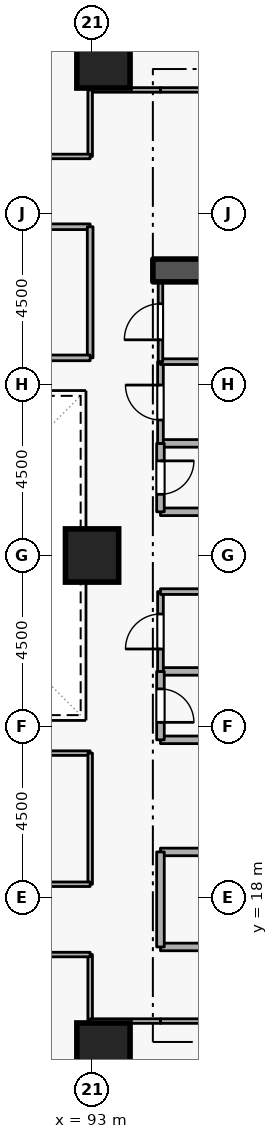
"""IFC4 building model, lengths in metres.
Left out: names, types, materials, properties, quantities, classifications, styles, units other than length and angle.
Written with IfcOpenShell. Run it as: python <this file> out.ifc"""

import sys

from ifc_helpers import new_model, si_unit, direction, frame, frame_2d, origin, origin_2d, place, context, subcontext, project, spatial, rectangle, extrude, element, fill, save


model = new_model("IFC4")
c1 = context("Model", 3, precision=1e-05, world=origin(), true_north=direction((0.0, 1.0)))
c2 = subcontext(c1, "Body", "Model", "MODEL_VIEW")
j1 = project(units=[si_unit("LENGTHUNIT", "METRE"), si_unit("PLANEANGLEUNIT", "RADIAN")], contexts=[c1])
p1 = place(None, origin())
s1 = spatial("IfcSite", under=j1, at=p1, CompositionType="ELEMENT")
p2 = place(p1, origin())
s2 = spatial("IfcBuilding", under=s1, at=p2, CompositionType="ELEMENT")
p3 = place(p2, frame((0.0, 0.0, 68.1)))
s3 = spatial("IfcBuildingStorey", under=s2, at=p3, CompositionType="ELEMENT", Elevation=68.1)
p4 = place(p3, frame((94.6, 34.5, 0.0), z_axis=(0.0, 0.0, 1.0), x_axis=(1.0, 0.0, 0.0)))
e1 = element("IfcWall", 1, at=p4, inside=s3, PredefinedType="SHEAR", context=c2, shape_type="SweptSolid", body=[
    extrude(rectangle(XDim=5.7, YDim=0.6, at=frame_2d((2.85, 0.0))), origin(), (0.0, 0.0, 1.0), 3.6),
])
for number, where, z_axis, x_axis in (
    (2, (93.3, 14.0, 0.0), (0.0, 0.0, 1.0), (1.0, 0.0, 0.0)),
    (3, (93.3, 40.0, 0.0), (0.0, 0.0, 1.0), (1.0, 0.0, 0.0)),
    (4, (93.0, 27.0, 0.0), (0.0, 0.0, 1.0), (1.0, 0.0, 0.0)),
):
    element("IfcColumn", number, at=place(p3, frame(where, z_axis=z_axis, x_axis=x_axis)), inside=s3, PredefinedType="COLUMN", context=c2, shape_type="SweptSolid", body=[
        extrude(rectangle(XDim=1.4, YDim=1.4, at=origin_2d()), origin(), (0.0, 0.0, 1.0), 3.6),
    ])
p5 = place(p3, frame((94.8, 16.7, 0.0), z_axis=(0.0, 0.0, 1.0), x_axis=(1.0, 0.0, 0.0)))
e5 = element("IfcWall", 5, at=p5, inside=s3, PredefinedType="STANDARD", context=c2, shape_type="SweptSolid", body=[
    extrude(rectangle(XDim=5.7, YDim=0.2, at=frame_2d((2.85, 0.0))), origin(), (0.0, 0.0, 1.0), 3.26),
])
p6 = place(p5, frame((2.275, 0.0, 0.0)))
e6 = element("IfcOpeningElement", 6, at=p6, cuts=e5, PredefinedType="OPENING", context=c2, shape_type="SweptSolid", body=[
    extrude(rectangle(XDim=1.15, YDim=2.1, at=frame_2d((0.575, 1.05))), frame((0.0, 0.11, 0.0), z_axis=(0.0, -1.0, 0.0), x_axis=(1.0, 0.0, 0.0)), (0.0, 0.0, 1.0), 0.22),
])
p7 = place(p3, frame((97.1, 19.2, 0.0), z_axis=(0.0, 0.0, 1.0), x_axis=(-1.0, 0.0, 0.0)))
e7 = element("IfcWall", 7, at=p7, inside=s3, PredefinedType="STANDARD", context=c2, shape_type="SweptSolid", body=[
    extrude(rectangle(XDim=2.3, YDim=0.2, at=frame_2d((1.15, 0.0))), origin(), (0.0, 0.0, 1.0), 2.465),
])
p8 = place(p3, frame((94.8, 19.2, 0.0), z_axis=(0.0, 0.0, 1.0), x_axis=(0.0, -1.0, 0.0)))
e8 = element("IfcWall", 8, at=p8, inside=s3, PredefinedType="STANDARD", context=c2, shape_type="SweptSolid", body=[
    extrude(rectangle(XDim=2.5, YDim=0.2, at=frame_2d((1.25, 0.0))), origin(), (0.0, 0.0, 1.0), 3.26),
])
for number, where, z_axis, x_axis in (
    (9, (94.8, 28.15, 0.0), (0.0, 0.0, 1.0), (1.0, 0.0, 0.0)),
    (10, (96.85, 29.95, 0.0), (0.0, 0.0, 1.0), (-1.0, 0.0, 0.0)),
):
    element("IfcWall", number, at=place(p3, frame(where, z_axis=z_axis, x_axis=x_axis)), inside=s3, PredefinedType="STANDARD", context=c2, shape_type="SweptSolid", body=[
        extrude(rectangle(XDim=2.05, YDim=0.2, at=frame_2d((1.025, 0.0))), origin(), (0.0, 0.0, 1.0), 3.26),
    ])
p9 = place(p3, frame((94.8, 29.95, 0.0), z_axis=(0.0, 0.0, 1.0), x_axis=(0.0, -1.0, 0.0)))
e11 = element("IfcWall", 11, at=p9, inside=s3, PredefinedType="STANDARD", context=c2, shape_type="SweptSolid", body=[
    extrude(rectangle(XDim=1.8, YDim=0.2, at=frame_2d((0.9, 0.0))), origin(), (0.0, 0.0, 1.0), 3.26),
])
p10 = place(p9, frame((0.46, 0.0, 0.0)))
e12 = element("IfcOpeningElement", 12, at=p10, cuts=e11, PredefinedType="OPENING", context=c2, shape_type="SweptSolid", body=[
    extrude(rectangle(XDim=0.88, YDim=2.04, at=frame_2d((0.44, 1.02))), frame((0.0, 0.11, 0.0), z_axis=(0.0, -1.0, 0.0), x_axis=(1.0, 0.0, 0.0)), (0.0, 0.0, 1.0), 0.22),
])
for number, where, z_axis, x_axis in (
    (13, (94.8, 22.15, 0.0), (0.0, 0.0, 1.0), (1.0, 0.0, 0.0)),
    (14, (96.85, 23.95, 0.0), (0.0, 0.0, 1.0), (-1.0, 0.0, 0.0)),
):
    element("IfcWall", number, at=place(p3, frame(where, z_axis=z_axis, x_axis=x_axis)), inside=s3, PredefinedType="STANDARD", context=c2, shape_type="SweptSolid", body=[
        extrude(rectangle(XDim=2.05, YDim=0.2, at=frame_2d((1.025, 0.0))), origin(), (0.0, 0.0, 1.0), 3.26),
    ])
p11 = place(p3, frame((94.8, 23.95, 0.0), z_axis=(0.0, 0.0, 1.0), x_axis=(0.0, -1.0, 0.0)))
e15 = element("IfcWall", 15, at=p11, inside=s3, PredefinedType="STANDARD", context=c2, shape_type="SweptSolid", body=[
    extrude(rectangle(XDim=1.8, YDim=0.2, at=frame_2d((0.9, 0.0))), origin(), (0.0, 0.0, 1.0), 3.26),
])
p12 = place(p11, frame((0.46, 0.0, 0.0)))
e16 = element("IfcOpeningElement", 16, at=p12, cuts=e15, PredefinedType="OPENING", context=c2, shape_type="SweptSolid", body=[
    extrude(rectangle(XDim=0.88, YDim=2.04, at=frame_2d((0.44, 1.02))), frame((0.0, 0.11, 0.0), z_axis=(0.0, -1.0, 0.0), x_axis=(1.0, 0.0, 0.0)), (0.0, 0.0, 1.0), 0.22),
])
p13 = place(p3, frame((94.8, 23.95, 0.0), z_axis=(0.0, 0.0, 1.0), x_axis=(0.0, 1.0, 0.0)))
e17 = element("IfcWall", 17, at=p13, inside=s3, PredefinedType="PARTITIONING", context=c2, shape_type="SweptSolid", body=[
    extrude(rectangle(XDim=2.1, YDim=0.15, at=frame_2d((1.05, 0.0))), origin(), (0.0, 0.0, 1.0), 3.26),
])
p14 = place(p13, frame((0.59, 0.0, 0.0)))
e18 = element("IfcOpeningElement", 18, at=p14, cuts=e17, PredefinedType="OPENING", context=c2, shape_type="SweptSolid", body=[
    extrude(rectangle(XDim=0.92, YDim=2.08, at=frame_2d((0.46, 1.04))), frame((0.0, 0.085, 0.0), z_axis=(0.0, -1.0, 0.0), x_axis=(1.0, 0.0, 0.0)), (0.0, 0.0, 1.0), 0.17),
])
p15 = place(p3, frame((94.8, 26.05, 0.0), z_axis=(0.0, 0.0, 1.0), x_axis=(1.0, 0.0, 0.0)))
e19 = element("IfcWall", 19, at=p15, inside=s3, PredefinedType="PARTITIONING", context=c2, shape_type="SweptSolid", body=[
    extrude(rectangle(XDim=2.05, YDim=0.15, at=frame_2d((1.025, 0.0))), origin(), (0.0, 0.0, 1.0), 3.26),
])
p16 = place(p3, frame((94.8, 29.95, 0.0), z_axis=(0.0, 0.0, 1.0), x_axis=(0.0, 1.0, 0.0)))
e20 = element("IfcWall", 20, at=p16, inside=s3, PredefinedType="PARTITIONING", context=c2, shape_type="SweptSolid", body=[
    extrude(rectangle(XDim=2.15, YDim=0.15, at=frame_2d((1.075, 0.0))), origin(), (0.0, 0.0, 1.0), 3.26),
])
p17 = place(p16, frame((0.615, 0.0, 0.0)))
e21 = element("IfcOpeningElement", 21, at=p17, cuts=e20, PredefinedType="OPENING", context=c2, shape_type="SweptSolid", body=[
    extrude(rectangle(XDim=0.92, YDim=2.08, at=frame_2d((0.46, 1.04))), frame((0.0, 0.085, 0.0), z_axis=(0.0, -1.0, 0.0), x_axis=(1.0, 0.0, 0.0)), (0.0, 0.0, 1.0), 0.17),
])
p18 = place(p3, frame((94.8, 32.1, 0.0), z_axis=(0.0, 0.0, 1.0), x_axis=(1.0, 0.0, 0.0)))
e22 = element("IfcWall", 22, at=p18, inside=s3, PredefinedType="PARTITIONING", context=c2, shape_type="SweptSolid", body=[
    extrude(rectangle(XDim=2.05, YDim=0.15, at=frame_2d((1.025, 0.0))), origin(), (0.0, 0.0, 1.0), 3.26),
])
p19 = place(p3, frame((94.8, 32.1, 0.0), z_axis=(0.0, 0.0, 1.0), x_axis=(0.0, 1.0, 0.0)))
e23 = element("IfcWall", 23, at=p19, inside=s3, PredefinedType="PARTITIONING", context=c2, shape_type="SweptSolid", body=[
    extrude(rectangle(XDim=2.1, YDim=0.12, at=frame_2d((1.05, 0.0))), origin(), (0.0, 0.0, 1.0), 3.26),
])
p20 = place(p19, frame((0.575, 0.0, 0.0)))
e24 = element("IfcOpeningElement", 24, at=p20, cuts=e23, PredefinedType="OPENING", context=c2, shape_type="SweptSolid", body=[
    extrude(rectangle(XDim=0.95, YDim=2.1, at=frame_2d((0.475, 1.05))), frame((0.0, 0.07, 0.0), z_axis=(0.0, -1.0, 0.0), x_axis=(1.0, 0.0, 0.0)), (0.0, 0.0, 1.0), 0.14),
])
p21 = place(p3, frame((92.95, 16.5, 0.0), z_axis=(0.0, 0.0, 1.0), x_axis=(0.0, -1.0, 0.0)))
e25 = element("IfcWall", 25, at=p21, inside=s3, PredefinedType="PARTITIONING", context=c2, shape_type="SweptSolid", body=[
    extrude(rectangle(XDim=1.75, YDim=0.12, at=frame_2d((0.875, 0.0))), origin(), (0.0, 0.0, 1.0), 3.26),
])
p22 = place(p3, frame((92.95, 14.75, 0.0), z_axis=(0.0, 0.0, 1.0), x_axis=(1.0, 0.0, 0.0)))
e26 = element("IfcWall", 26, at=p22, inside=s3, PredefinedType="PARTITIONING", context=c2, shape_type="SweptSolid", body=[
    extrude(rectangle(XDim=1.85, YDim=0.12, at=frame_2d((0.925, 0.0))), origin(), (0.0, 0.0, 1.0), 3.26),
])
p23 = place(p3, frame((94.8, 14.75, 0.0), z_axis=(0.0, 0.0, 1.0), x_axis=(1.0, 0.0, 0.0)))
e27 = element("IfcWall", 27, at=p23, inside=s3, PredefinedType="PARTITIONING", context=c2, shape_type="SweptSolid", body=[
    extrude(rectangle(XDim=9.35, YDim=0.12, at=frame_2d((4.675, 0.0))), origin(), (0.0, 0.0, 1.0), 3.26),
])
p24 = place(p23, frame((4.15, 0.0, 0.0)))
e28 = element("IfcOpeningElement", 28, at=p24, cuts=e27, PredefinedType="OPENING", context=c2, shape_type="SweptSolid", body=[
    extrude(rectangle(XDim=1.05, YDim=2.1, at=frame_2d((0.525, 1.05))), frame((0.0, 0.07, 0.0), z_axis=(0.0, -1.0, 0.0), x_axis=(1.0, 0.0, 0.0)), (0.0, 0.0, 1.0), 0.14),
])
p25 = place(p3, frame((88.5, 16.5, 0.0), z_axis=(0.0, 0.0, 1.0), x_axis=(1.0, 0.0, 0.0)))
e29 = element("IfcWall", 29, at=p25, inside=s3, PredefinedType="PARTITIONING", context=c2, shape_type="SweptSolid", body=[
    extrude(rectangle(XDim=4.45, YDim=0.12, at=frame_2d((2.225, 0.0))), origin(), (0.0, 0.0, 1.0), 3.26),
])
p26 = place(p3, frame((97.95, 39.25, 0.0), z_axis=(0.0, 0.0, 1.0), x_axis=(-1.0, 0.0, 0.0)))
e30 = element("IfcWall", 30, at=p26, inside=s3, PredefinedType="PARTITIONING", context=c2, shape_type="SweptSolid", body=[
    extrude(rectangle(XDim=3.15, YDim=0.12, at=frame_2d((1.575, 0.0))), origin(), (0.0, 0.0, 1.0), 3.26),
])
p27 = place(p3, frame((94.8, 39.25, 0.0), z_axis=(0.0, 0.0, 1.0), x_axis=(-1.0, 0.0, 0.0)))
e31 = element("IfcWall", 31, at=p27, inside=s3, PredefinedType="PARTITIONING", context=c2, shape_type="SweptSolid", body=[
    extrude(rectangle(XDim=1.85, YDim=0.12, at=frame_2d((0.925, 0.0))), origin(), (0.0, 0.0, 1.0), 3.26),
])
p28 = place(p3, frame((92.95, 39.25, 0.0), z_axis=(0.0, 0.0, 1.0), x_axis=(0.0, -1.0, 0.0)))
e32 = element("IfcWall", 32, at=p28, inside=s3, PredefinedType="PARTITIONING", context=c2, shape_type="SweptSolid", body=[
    extrude(rectangle(XDim=1.75, YDim=0.12, at=frame_2d((0.875, 0.0))), origin(), (0.0, 0.0, 1.0), 3.26),
])
p29 = place(p3, frame((92.95, 37.5, 0.0), z_axis=(0.0, 0.0, 1.0), x_axis=(-1.0, 0.0, 0.0)))
e33 = element("IfcWall", 33, at=p29, inside=s3, PredefinedType="PARTITIONING", context=c2, shape_type="SweptSolid", body=[
    extrude(rectangle(XDim=4.45, YDim=0.12, at=frame_2d((2.225, 0.0))), origin(), (0.0, 0.0, 1.0), 3.26),
])
p30 = place(p29, frame((1.7, 0.0, 0.0)))
e34 = element("IfcOpeningElement", 34, at=p30, cuts=e33, PredefinedType="OPENING", context=c2, shape_type="SweptSolid", body=[
    extrude(rectangle(XDim=1.05, YDim=2.1, at=frame_2d((0.525, 1.05))), frame((0.0, 0.07, 0.0), z_axis=(0.0, -1.0, 0.0), x_axis=(1.0, 0.0, 0.0)), (0.0, 0.0, 1.0), 0.14),
])
p31 = place(p3, frame((84.05, 35.65, 0.0), z_axis=(0.0, 0.0, 1.0), x_axis=(1.0, 0.0, 0.0)))
e35 = element("IfcWall", 35, at=p31, inside=s3, PredefinedType="PARTITIONING", context=c2, shape_type="SweptSolid", body=[
    extrude(rectangle(XDim=8.9, YDim=0.15, at=frame_2d((4.45, 0.0))), origin(), (0.0, 0.0, 1.0), 3.26),
])
p32 = place(p31, frame((3.8, 0.0, 0.0)))
e36 = element("IfcOpeningElement", 36, at=p32, cuts=e35, PredefinedType="OPENING", context=c2, shape_type="SweptSolid", body=[
    extrude(rectangle(XDim=1.3, YDim=2.12, at=frame_2d((0.65, 1.06))), frame((0.0, 0.085, 0.0), z_axis=(0.0, -1.0, 0.0), x_axis=(1.0, 0.0, 0.0)), (0.0, 0.0, 1.0), 0.17),
])
p33 = place(p3, frame((92.95, 35.65, 0.0), z_axis=(0.0, 0.0, 1.0), x_axis=(0.0, -1.0, 0.0)))
e37 = element("IfcWall", 37, at=p33, inside=s3, PredefinedType="PARTITIONING", context=c2, shape_type="SweptSolid", body=[
    extrude(rectangle(XDim=3.45, YDim=0.15, at=frame_2d((1.725, 0.0))), origin(), (0.0, 0.0, 1.0), 3.26),
])
p34 = place(p3, frame((92.95, 32.2, 0.0), z_axis=(0.0, 0.0, 1.0), x_axis=(-1.0, 0.0, 0.0)))
e38 = element("IfcWall", 38, at=p34, inside=s3, PredefinedType="PARTITIONING", context=c2, shape_type="SweptSolid", body=[
    extrude(rectangle(XDim=8.9, YDim=0.15, at=frame_2d((4.45, 0.0))), origin(), (0.0, 0.0, 1.0), 3.26),
])
p35 = place(p3, frame((84.05, 21.8, 0.0), z_axis=(0.0, 0.0, 1.0), x_axis=(1.0, 0.0, 0.0)))
e39 = element("IfcWall", 39, at=p35, inside=s3, PredefinedType="PARTITIONING", context=c2, shape_type="SweptSolid", body=[
    extrude(rectangle(XDim=8.9, YDim=0.12, at=frame_2d((4.45, 0.0))), origin(), (0.0, 0.0, 1.0), 3.26),
])
p36 = place(p3, frame((92.95, 21.8, 0.0), z_axis=(0.0, 0.0, 1.0), x_axis=(0.0, -1.0, 0.0)))
e40 = element("IfcWall", 40, at=p36, inside=s3, PredefinedType="PARTITIONING", context=c2, shape_type="SweptSolid", body=[
    extrude(rectangle(XDim=3.45, YDim=0.12, at=frame_2d((1.725, 0.0))), origin(), (0.0, 0.0, 1.0), 3.26),
])
p37 = place(p3, frame((92.95, 18.35, 0.0), z_axis=(0.0, 0.0, 1.0), x_axis=(-1.0, 0.0, 0.0)))
e41 = element("IfcWall", 41, at=p37, inside=s3, PredefinedType="PARTITIONING", context=c2, shape_type="SweptSolid", body=[
    extrude(rectangle(XDim=8.9, YDim=0.12, at=frame_2d((4.45, 0.0))), origin(), (0.0, 0.0, 1.0), 3.26),
])
p38 = place(p37, frame((3.975, 0.0, 0.0)))
e42 = element("IfcOpeningElement", 42, at=p38, cuts=e41, PredefinedType="OPENING", context=c2, shape_type="SweptSolid", body=[
    extrude(rectangle(XDim=0.95, YDim=2.1, at=frame_2d((0.475, 1.05))), frame((0.0, 0.07, 0.0), z_axis=(0.0, -1.0, 0.0), x_axis=(1.0, 0.0, 0.0)), (0.0, 0.0, 1.0), 0.14),
])
p39 = place(p10, origin())
e43 = element("IfcDoor", 43, at=p39, inside=s3, OperationType="SINGLE_SWING_LEFT", PredefinedType="DOOR", context=c2, shape_type="SweptSolid", body=[
    extrude(rectangle(XDim=0.88, YDim=2.04, at=frame_2d((0.44, 1.02))), frame((0.0, 0.025, 0.0), z_axis=(0.0, -1.0, 0.0), x_axis=(1.0, 0.0, 0.0)), (0.0, 0.0, 1.0), 0.05),
])
fill(e12, e43)
p40 = place(p12, origin())
e44 = element("IfcDoor", 44, at=p40, inside=s3, OperationType="SINGLE_SWING_RIGHT", PredefinedType="DOOR", context=c2, shape_type="SweptSolid", body=[
    extrude(rectangle(XDim=0.88, YDim=2.04, at=frame_2d((0.44, 1.02))), frame((0.0, 0.025, 0.0), z_axis=(0.0, -1.0, 0.0), x_axis=(1.0, 0.0, 0.0)), (0.0, 0.0, 1.0), 0.05),
])
fill(e16, e44)
p41 = place(p14, origin())
e45 = element("IfcDoor", 45, at=p41, inside=s3, OperationType="SINGLE_SWING_LEFT", PredefinedType="DOOR", context=c2, shape_type="SweptSolid", body=[
    extrude(rectangle(XDim=0.92, YDim=2.08, at=frame_2d((0.46, 1.04))), frame((0.0, 0.025, 0.0), z_axis=(0.0, -1.0, 0.0), x_axis=(1.0, 0.0, 0.0)), (0.0, 0.0, 1.0), 0.05),
])
fill(e18, e45)
p42 = place(p17, origin())
e46 = element("IfcDoor", 46, at=p42, inside=s3, OperationType="SINGLE_SWING_RIGHT", PredefinedType="DOOR", context=c2, shape_type="SweptSolid", body=[
    extrude(rectangle(XDim=0.92, YDim=2.08, at=frame_2d((0.46, 1.04))), frame((0.0, 0.025, 0.0), z_axis=(0.0, -1.0, 0.0), x_axis=(1.0, 0.0, 0.0)), (0.0, 0.0, 1.0), 0.05),
])
fill(e21, e46)
p43 = place(p20, origin())
e47 = element("IfcDoor", 47, at=p43, inside=s3, OperationType="SINGLE_SWING_LEFT", PredefinedType="DOOR", context=c2, shape_type="SweptSolid", body=[
    extrude(rectangle(XDim=0.95, YDim=2.1, at=frame_2d((0.475, 1.05))), frame((0.0, 0.025, 0.0), z_axis=(0.0, -1.0, 0.0), x_axis=(1.0, 0.0, 0.0)), (0.0, 0.0, 1.0), 0.05),
])
fill(e24, e47)
save(model, sys.argv[1])
